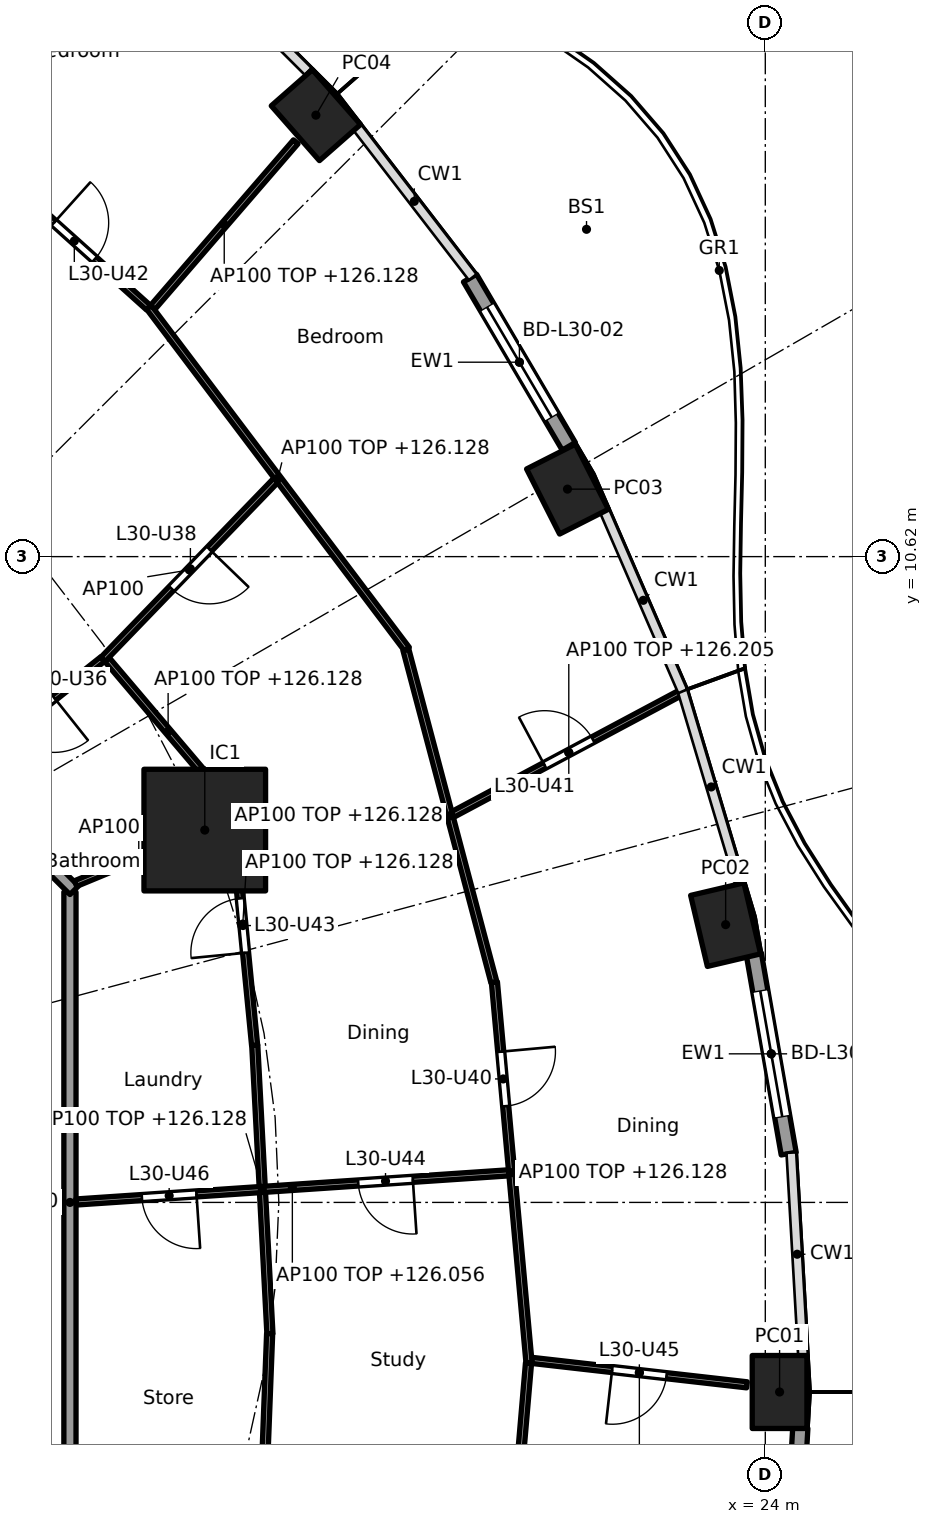
"""IFC4 building model, lengths in metres.
Left out: names, types, materials, properties, quantities, classifications, styles, units other than length and angle.
Written with IfcOpenShell. Run it as: python <this file> out.ifc"""

import sys

from ifc_helpers import new_model, si_unit, direction, frame, frame_2d, origin, origin_2d, place, context, subcontext, project, spatial, rectangle, hollow_rectangle, extrude, element, fill, save


model = new_model("IFC4")
c1 = context("Model", 3, precision=1e-05, world=origin(), true_north=direction((0.0, 1.0)))
c2 = subcontext(c1, "Body", "Model", "MODEL_VIEW")
j1 = project(units=[si_unit("LENGTHUNIT", "METRE"), si_unit("PLANEANGLEUNIT", "RADIAN")], contexts=[c1])
p1 = place(None, origin())
s1 = spatial("IfcSite", under=j1, at=p1, CompositionType="ELEMENT")
p2 = place(p1, origin())
s2 = spatial("IfcBuilding", under=s1, at=p2, CompositionType="ELEMENT")
p3 = place(p2, frame((0.0, 0.0, 123.3)))
s3 = spatial("IfcBuildingStorey", under=s2, at=p3, CompositionType="ELEMENT", Elevation=123.3)
for number, where, z_axis, x_axis in (
    (1, (24.235, -3.118, 0.0), (0.0, 0.0, 1.0), (0.0, 1.0, 0.0)),
    (2, (23.348, 4.568, 0.0), (0.0, 0.0, 1.0), (-0.229, 0.973, 0.0)),
    (3, (20.747, 11.73, 0.0), (0.0, 0.0, 1.0), (-0.452, 0.892, 0.0)),
    (4, (16.61, 17.88, 0.0), (0.0, 0.0, 1.0), (-0.66, 0.751, 0.0)),
):
    element("IfcColumn", number, at=place(p3, frame(where, z_axis=z_axis, x_axis=x_axis)), inside=s3, PredefinedType="COLUMN", context=c2, shape_type="SweptSolid", body=[
        extrude(hollow_rectangle(XDim=1.2, YDim=0.9, WallThickness=0.04, at=origin_2d()), origin(), (0.0, 0.0, 1.0), 3.7),
    ])
p4 = place(p3, frame((14.782, 6.123, 0.0), z_axis=(0.0, 0.0, 1.0), x_axis=(1.0, 0.0, 0.0)))
e5 = element("IfcColumn", 5, at=p4, inside=s3, PredefinedType="COLUMN", context=c2, shape_type="SweptSolid", body=[
    extrude(rectangle(XDim=2.0, YDim=2.0, at=origin_2d()), origin(), (0.0, 0.0, 1.0), 3.7),
])
p5 = place(p3, frame((23.811, 4.085, 0.0), z_axis=(0.0, 0.0, 1.0), x_axis=(0.172163521006, -0.985068384446, 0.0)))
e6 = element("IfcWall", 6, at=p5, inside=s3, PredefinedType="SOLIDWALL", context=c2, shape_type="SweptSolid", body=[
    extrude(rectangle(XDim=3.333, YDim=0.25, at=frame_2d((1.666, 0.0))), origin(), (0.0, 0.0, 1.0), 3.44),
])
p6 = place(p5, frame((0.616, 0.0, 0.0)))
e7 = element("IfcOpeningElement", 7, at=p6, cuts=e6, PredefinedType="OPENING", context=c2, shape_type="SweptSolid", body=[
    extrude(rectangle(XDim=2.1, YDim=2.4, at=frame_2d((1.05, 1.2))), frame((0.0, 0.135, 0.0), z_axis=(0.0, -1.0, 0.0), x_axis=(1.0, 0.0, 0.0)), (0.0, 0.0, 1.0), 0.27),
])
p7 = place(p3, frame((19.144, 15.201, 0.0), z_axis=(0.0, 0.0, 1.0), x_axis=(0.506314982873, -0.862348617508, 0.0)))
e8 = element("IfcWall", 8, at=p7, inside=s3, PredefinedType="SOLIDWALL", context=c2, shape_type="SweptSolid", body=[
    extrude(rectangle(XDim=3.208, YDim=0.25, at=frame_2d((1.604, 0.0))), origin(), (0.0, 0.0, 1.0), 3.44),
])
p8 = place(p7, frame((0.554, 0.0, 0.0)))
e9 = element("IfcOpeningElement", 9, at=p8, cuts=e8, PredefinedType="OPENING", context=c2, shape_type="SweptSolid", body=[
    extrude(rectangle(XDim=2.1, YDim=2.4, at=frame_2d((1.05, 1.2))), frame((0.0, 0.135, 0.0), z_axis=(0.0, -1.0, 0.0), x_axis=(1.0, 0.0, 0.0)), (0.0, 0.0, 1.0), 0.27),
])
p9 = place(p3, frame((24.576, -3.709, 0.0), z_axis=(0.0, 0.0, 1.0), x_axis=(-0.05746514539, -0.998347513176, 0.0)))
e10 = element("IfcWall", 10, at=p9, inside=s3, PredefinedType="SOLIDWALL", context=c2, shape_type="SweptSolid", body=[
    extrude(rectangle(XDim=3.348, YDim=0.25, at=frame_2d((1.674, 0.0))), origin(), (0.0, 0.0, 1.0), 3.44),
])
p10 = place(p9, frame((0.624, 0.0, 0.0)))
e11 = element("IfcOpeningElement", 11, at=p10, cuts=e10, PredefinedType="OPENING", context=c2, shape_type="SweptSolid", body=[
    extrude(rectangle(XDim=2.1, YDim=2.4, at=frame_2d((1.05, 1.2))), frame((0.0, 0.135, 0.0), z_axis=(0.0, -1.0, 0.0), x_axis=(1.0, 0.0, 0.0)), (0.0, 0.0, 1.0), 0.27),
])
p11 = place(p3, frame((12.565, -5.104, 0.0), z_axis=(0.0, 0.0, 1.0), x_axis=(0.0, 1.0, 0.0)))
e12 = element("IfcWall", 12, at=p11, inside=s3, PredefinedType="PARTITIONING", context=c2, shape_type="SweptSolid", body=[
    extrude(rectangle(XDim=10.209, YDim=0.2, at=frame_2d((5.104, 0.0))), origin(), (0.0, 0.0, 1.0), 3.44),
])
p12 = place(p3, frame((12.635, 5.134, 0.0), z_axis=(0.0, 0.0, 1.0), x_axis=(-0.707106781187, 0.707106781187, 0.0)))
e13 = element("IfcWall", 13, at=p12, inside=s3, PredefinedType="PARTITIONING", context=c2, shape_type="SweptSolid", body=[
    extrude(rectangle(XDim=10.609, YDim=0.2, at=frame_2d((5.305, 0.0))), origin(), (0.0, 0.0, 1.0), 3.44),
])
p13 = place(p12, frame((4.804, 0.0, 0.0)))
e14 = element("IfcOpeningElement", 14, at=p13, cuts=e13, PredefinedType="OPENING", context=c2, shape_type="SweptSolid", body=[
    extrude(rectangle(XDim=1.0, YDim=2.1, at=frame_2d((0.5, 1.05))), frame((0.0, 0.11, 0.0), z_axis=(0.0, -1.0, 0.0), x_axis=(1.0, 0.0, 0.0)), (0.0, 0.0, 1.0), 0.22),
])
p14 = place(p3, frame((15.853, -2.158, 0.0), z_axis=(0.0, 0.0, 1.0), x_axis=(-0.052483289253, 0.99862180246, 0.0)))
e15 = element("IfcWall", 15, at=p14, inside=s3, PredefinedType="PARTITIONING", context=c2, shape_type="SweptSolid", body=[
    extrude(rectangle(XDim=4.75, YDim=0.1, at=frame_2d((2.375, 0.0))), origin(), (0.0, 0.0, 1.0), 2.828),
])
p15 = place(p3, frame((15.849, -2.158, 0.0), z_axis=(0.0, 0.0, 1.0), x_axis=(-0.038390448414, -0.999262815014, 0.0)))
e16 = element("IfcWall", 16, at=p15, inside=s3, PredefinedType="PARTITIONING", context=c2, shape_type="SweptSolid", body=[
    extrude(rectangle(XDim=4.394, YDim=0.1, at=frame_2d((2.197, 0.0))), origin(), (0.0, 0.0, 1.0), 3.44),
])
p16 = place(p3, frame((20.16, -2.598, 0.0), z_axis=(0.0, 0.0, 1.0), x_axis=(0.993610673305, -0.112861994911, 0.0)))
e17 = element("IfcWall", 17, at=p16, inside=s3, PredefinedType="PARTITIONING", context=c2, shape_type="SweptSolid", body=[
    extrude(rectangle(XDim=3.561, YDim=0.1, at=frame_2d((1.78, 0.0))), origin(), (0.0, 0.0, 1.0), 2.828),
])
p17 = place(p16, frame((1.33, 0.0, 0.0)))
e18 = element("IfcOpeningElement", 18, at=p17, cuts=e17, PredefinedType="OPENING", context=c2, shape_type="SweptSolid", body=[
    extrude(rectangle(XDim=0.9, YDim=2.1, at=frame_2d((0.45, 1.05))), frame((0.0, 0.06, 0.0), z_axis=(0.0, -1.0, 0.0), x_axis=(1.0, 0.0, 0.0)), (0.0, 0.0, 1.0), 0.12),
])
p18 = place(p3, frame((20.115, -2.642, 0.0), z_axis=(0.0, 0.0, 1.0), x_axis=(-0.090563746294, 0.995890660593, 0.0)))
e19 = element("IfcWall", 19, at=p18, inside=s3, PredefinedType="PARTITIONING", context=c2, shape_type="SweptSolid", body=[
    extrude(rectangle(XDim=6.289, YDim=0.1, at=frame_2d((3.145, 0.0))), origin(), (0.0, 0.0, 1.0), 2.828),
])
p19 = place(p18, frame((4.242, 0.0, 0.0)))
e20 = element("IfcOpeningElement", 20, at=p19, cuts=e19, PredefinedType="OPENING", context=c2, shape_type="SweptSolid", body=[
    extrude(rectangle(XDim=0.9, YDim=2.1, at=frame_2d((0.45, 1.05))), frame((0.0, 0.06, 0.0), z_axis=(0.0, -1.0, 0.0), x_axis=(1.0, 0.0, 0.0)), (0.0, 0.0, 1.0), 0.12),
])
p20 = place(p3, frame((20.106, -2.642, 0.0), z_axis=(0.0, 0.0, 1.0), x_axis=(-0.085672025822, -0.996323393277, 0.0)))
e21 = element("IfcWall", 21, at=p20, inside=s3, PredefinedType="PARTITIONING", context=c2, shape_type="SweptSolid", body=[
    extrude(rectangle(XDim=6.007, YDim=0.1, at=frame_2d((3.003, 0.0))), origin(), (0.0, 0.0, 1.0), 2.828),
])
p21 = place(p3, frame((12.665, 0.007, 0.0), z_axis=(0.0, 0.0, 1.0), x_axis=(0.997737186236, 0.067234717233, 0.0)))
e22 = element("IfcWall", 22, at=p21, inside=s3, PredefinedType="PARTITIONING", context=c2, shape_type="SweptSolid", body=[
    extrude(rectangle(XDim=7.132, YDim=0.1, at=frame_2d((3.566, 0.0))), origin(), (0.0, 0.0, 1.0), 2.756),
])
p22 = place(p21, frame((4.651, 0.0, 0.0)))
e23 = element("IfcOpeningElement", 23, at=p22, cuts=e22, PredefinedType="OPENING", context=c2, shape_type="SweptSolid", body=[
    extrude(rectangle(XDim=0.9, YDim=2.1, at=frame_2d((0.45, 1.05))), frame((0.0, 0.06, 0.0), z_axis=(0.0, -1.0, 0.0), x_axis=(1.0, 0.0, 0.0)), (0.0, 0.0, 1.0), 0.12),
])
p23 = place(p21, frame((1.085, 0.0, 0.0)))
e24 = element("IfcOpeningElement", 24, at=p23, cuts=e22, PredefinedType="OPENING", context=c2, shape_type="SweptSolid", body=[
    extrude(rectangle(XDim=0.9, YDim=2.1, at=frame_2d((0.45, 1.05))), frame((0.0, 0.06, 0.0), z_axis=(0.0, -1.0, 0.0), x_axis=(1.0, 0.0, 0.0)), (0.0, 0.0, 1.0), 0.12),
])
p24 = place(p3, frame((15.602, 2.584, 0.0), z_axis=(0.0, 0.0, 1.0), x_axis=(-0.097216297846, 0.995263277446, 0.0)))
e25 = element("IfcWall", 25, at=p24, inside=s3, PredefinedType="PARTITIONING", context=c2, shape_type="SweptSolid", body=[
    extrude(rectangle(XDim=4.006, YDim=0.1, at=frame_2d((2.003, 0.0))), origin(), (0.0, 0.0, 1.0), 2.828),
])
p25 = place(p24, frame((1.528, 0.0, 0.0)))
e26 = element("IfcOpeningElement", 26, at=p25, cuts=e25, PredefinedType="OPENING", context=c2, shape_type="SweptSolid", body=[
    extrude(rectangle(XDim=0.9, YDim=2.1, at=frame_2d((0.45, 1.05))), frame((0.0, 0.06, 0.0), z_axis=(0.0, -1.0, 0.0), x_axis=(1.0, 0.0, 0.0)), (0.0, 0.0, 1.0), 0.12),
])
p26 = place(p3, frame((19.537, 3.62, 0.0), z_axis=(0.0, 0.0, 1.0), x_axis=(-0.255892560316, 0.966705227862, 0.0)))
e27 = element("IfcWall", 27, at=p26, inside=s3, PredefinedType="PARTITIONING", context=c2, shape_type="SweptSolid", body=[
    extrude(rectangle(XDim=5.659, YDim=0.1, at=frame_2d((2.829, 0.0))), origin(), (0.0, 0.0, 1.0), 2.828),
])
p27 = place(p3, frame((18.857, 6.378, 0.0), z_axis=(0.0, 0.0, 1.0), x_axis=(0.882223462934, 0.470830926607, 0.0)))
e28 = element("IfcWall", 28, at=p27, inside=s3, PredefinedType="PARTITIONING", context=c2, shape_type="SweptSolid", body=[
    extrude(rectangle(XDim=4.333, YDim=0.1, at=frame_2d((2.167, 0.0))), origin(), (0.0, 0.0, 1.0), 2.905),
])
p28 = place(p27, frame((1.717, 0.0, 0.0)))
e29 = element("IfcOpeningElement", 29, at=p28, cuts=e28, PredefinedType="OPENING", context=c2, shape_type="SweptSolid", body=[
    extrude(rectangle(XDim=0.9, YDim=2.1, at=frame_2d((0.45, 1.05))), frame((0.0, 0.06, 0.0), z_axis=(0.0, -1.0, 0.0), x_axis=(1.0, 0.0, 0.0)), (0.0, 0.0, 1.0), 0.12),
])
p29 = place(p3, frame((12.657, 5.243, 0.0), z_axis=(0.0, 0.0, 1.0), x_axis=(0.923864733477, 0.382719158442, 0.0)))
e30 = element("IfcWall", 30, at=p29, inside=s3, PredefinedType="PARTITIONING", context=c2, shape_type="SweptSolid", body=[
    extrude(rectangle(XDim=2.25, YDim=0.1, at=frame_2d((1.125, 0.0))), origin(), (0.0, 0.0, 1.0), 3.44),
])
p30 = place(p3, frame((15.185, 6.559, 0.0), z_axis=(0.0, 0.0, 1.0), x_axis=(-0.647360926376, 0.762183594026, 0.0)))
e31 = element("IfcWall", 31, at=p30, inside=s3, PredefinedType="PARTITIONING", context=c2, shape_type="SweptSolid", body=[
    extrude(rectangle(XDim=3.106, YDim=0.1, at=frame_2d((1.553, 0.0))), origin(), (0.0, 0.0, 1.0), 2.828),
])
p31 = place(p3, frame((18.106, 9.098, 0.0), z_axis=(0.0, 0.0, 1.0), x_axis=(-0.602398572907, 0.798195439325, 0.0)))
e32 = element("IfcWall", 32, at=p31, inside=s3, PredefinedType="PARTITIONING", context=c2, shape_type="SweptSolid", body=[
    extrude(rectangle(XDim=7.044, YDim=0.1, at=frame_2d((3.522, 0.0))), origin(), (0.0, 0.0, 1.0), 2.828),
])
p32 = place(p3, frame((10.803, 7.107, 0.0), z_axis=(0.0, 0.0, 1.0), x_axis=(0.782908385935, 0.622137010017, 0.0)))
e33 = element("IfcWall", 33, at=p32, inside=s3, PredefinedType="PARTITIONING", context=c2, shape_type="SweptSolid", body=[
    extrude(rectangle(XDim=2.937, YDim=0.1, at=frame_2d((1.469, 0.0))), origin(), (0.0, 0.0, 1.0), 2.756),
])
p33 = place(p32, frame((1.019, 0.0, 0.0)))
e34 = element("IfcOpeningElement", 34, at=p33, cuts=e33, PredefinedType="OPENING", context=c2, shape_type="SweptSolid", body=[
    extrude(rectangle(XDim=0.9, YDim=2.1, at=frame_2d((0.45, 1.05))), frame((0.0, 0.06, 0.0), z_axis=(0.0, -1.0, 0.0), x_axis=(1.0, 0.0, 0.0)), (0.0, 0.0, 1.0), 0.12),
])
p34 = place(p3, frame((13.107, 8.929, 0.0), z_axis=(0.0, 0.0, 1.0), x_axis=(0.694592384931, 0.719403515974, 0.0)))
e35 = element("IfcWall", 35, at=p34, inside=s3, PredefinedType="PARTITIONING", context=c2, shape_type="SweptSolid", body=[
    extrude(rectangle(XDim=4.094, YDim=0.1, at=frame_2d((2.047, 0.0))), origin(), (0.0, 0.0, 1.0), 3.44),
])
p35 = place(p34, frame((1.622, 0.0, 0.0)))
e36 = element("IfcOpeningElement", 36, at=p35, cuts=e35, PredefinedType="OPENING", context=c2, shape_type="SweptSolid", body=[
    extrude(rectangle(XDim=0.9, YDim=2.1, at=frame_2d((0.45, 1.05))), frame((0.0, 0.06, 0.0), z_axis=(0.0, -1.0, 0.0), x_axis=(1.0, 0.0, 0.0)), (0.0, 0.0, 1.0), 0.12),
])
p36 = place(p3, frame((13.926, 14.719, 0.0), z_axis=(0.0, 0.0, 1.0), x_axis=(0.653831857253, 0.756639876323, 0.0)))
e37 = element("IfcWall", 37, at=p36, inside=s3, PredefinedType="PARTITIONING", context=c2, shape_type="SweptSolid", body=[
    extrude(rectangle(XDim=3.598, YDim=0.1, at=frame_2d((1.799, 0.0))), origin(), (0.0, 0.0, 1.0), 2.828),
])
p37 = place(p3, frame((13.856, 14.714, 0.0), z_axis=(0.0, 0.0, 1.0), x_axis=(-0.743799395746, 0.668402916577, 0.0)))
e38 = element("IfcWall", 38, at=p37, inside=s3, PredefinedType="PARTITIONING", context=c2, shape_type="SweptSolid", body=[
    extrude(rectangle(XDim=6.509, YDim=0.1, at=frame_2d((3.254, 0.0))), origin(), (0.0, 0.0, 1.0), 2.828),
])
p38 = place(p37, frame((1.19, 0.0, 0.0)))
e39 = element("IfcOpeningElement", 39, at=p38, cuts=e38, PredefinedType="OPENING", context=c2, shape_type="SweptSolid", body=[
    extrude(rectangle(XDim=0.9, YDim=2.1, at=frame_2d((0.45, 1.05))), frame((0.0, 0.06, 0.0), z_axis=(0.0, -1.0, 0.0), x_axis=(1.0, 0.0, 0.0)), (0.0, 0.0, 1.0), 0.12),
])
p39 = place(p6, origin())
e40 = element("IfcDoor", 40, at=p39, inside=s3, OperationType="SLIDING_TO_LEFT", PredefinedType="DOOR", context=c2, shape_type="SweptSolid", body=[
    extrude(rectangle(XDim=2.1, YDim=2.4, at=frame_2d((1.05, 1.2))), frame((0.0, 0.025, 0.0), z_axis=(0.0, -1.0, 0.0), x_axis=(1.0, 0.0, 0.0)), (0.0, 0.0, 1.0), 0.05),
])
fill(e7, e40)
p40 = place(p8, origin())
e41 = element("IfcDoor", 41, at=p40, inside=s3, OperationType="SLIDING_TO_LEFT", PredefinedType="DOOR", context=c2, shape_type="SweptSolid", body=[
    extrude(rectangle(XDim=2.1, YDim=2.4, at=frame_2d((1.05, 1.2))), frame((0.0, 0.025, 0.0), z_axis=(0.0, -1.0, 0.0), x_axis=(1.0, 0.0, 0.0)), (0.0, 0.0, 1.0), 0.05),
])
fill(e9, e41)
p41 = place(p33, frame((0.9, 0.0, 0.0), x_axis=(-1.0, 0.0, 0.0)))
e42 = element("IfcDoor", 42, at=p41, inside=s3, OperationType="SINGLE_SWING_LEFT", PredefinedType="DOOR", context=c2, shape_type="SweptSolid", body=[
    extrude(rectangle(XDim=0.9, YDim=2.1, at=frame_2d((0.45, 1.05))), frame((0.0, 0.025, 0.0), z_axis=(0.0, -1.0, 0.0), x_axis=(1.0, 0.0, 0.0)), (0.0, 0.0, 1.0), 0.05),
])
fill(e34, e42)
p42 = place(p35, frame((0.9, 0.0, 0.0), x_axis=(-1.0, 0.0, 0.0)))
e43 = element("IfcDoor", 43, at=p42, inside=s3, OperationType="SINGLE_SWING_LEFT", PredefinedType="DOOR", context=c2, shape_type="SweptSolid", body=[
    extrude(rectangle(XDim=0.9, YDim=2.1, at=frame_2d((0.45, 1.05))), frame((0.0, 0.025, 0.0), z_axis=(0.0, -1.0, 0.0), x_axis=(1.0, 0.0, 0.0)), (0.0, 0.0, 1.0), 0.05),
])
fill(e36, e43)
p43 = place(p19, frame((0.9, 0.0, 0.0), x_axis=(-1.0, 0.0, 0.0)))
e44 = element("IfcDoor", 44, at=p43, inside=s3, OperationType="SINGLE_SWING_LEFT", PredefinedType="DOOR", context=c2, shape_type="SweptSolid", body=[
    extrude(rectangle(XDim=0.9, YDim=2.1, at=frame_2d((0.45, 1.05))), frame((0.0, 0.025, 0.0), z_axis=(0.0, -1.0, 0.0), x_axis=(1.0, 0.0, 0.0)), (0.0, 0.0, 1.0), 0.05),
])
fill(e20, e44)
p44 = place(p28, origin())
e45 = element("IfcDoor", 45, at=p44, inside=s3, OperationType="SINGLE_SWING_LEFT", PredefinedType="DOOR", context=c2, shape_type="SweptSolid", body=[
    extrude(rectangle(XDim=0.9, YDim=2.1, at=frame_2d((0.45, 1.05))), frame((0.0, 0.025, 0.0), z_axis=(0.0, -1.0, 0.0), x_axis=(1.0, 0.0, 0.0)), (0.0, 0.0, 1.0), 0.05),
])
fill(e29, e45)
p45 = place(p38, frame((0.9, 0.0, 0.0), x_axis=(-1.0, 0.0, 0.0)))
e46 = element("IfcDoor", 46, at=p45, inside=s3, OperationType="SINGLE_SWING_LEFT", PredefinedType="DOOR", context=c2, shape_type="SweptSolid", body=[
    extrude(rectangle(XDim=0.9, YDim=2.1, at=frame_2d((0.45, 1.05))), frame((0.0, 0.025, 0.0), z_axis=(0.0, -1.0, 0.0), x_axis=(1.0, 0.0, 0.0)), (0.0, 0.0, 1.0), 0.05),
])
fill(e39, e46)
p46 = place(p25, origin())
e47 = element("IfcDoor", 47, at=p46, inside=s3, OperationType="SINGLE_SWING_LEFT", PredefinedType="DOOR", context=c2, shape_type="SweptSolid", body=[
    extrude(rectangle(XDim=0.9, YDim=2.1, at=frame_2d((0.45, 1.05))), frame((0.0, 0.025, 0.0), z_axis=(0.0, -1.0, 0.0), x_axis=(1.0, 0.0, 0.0)), (0.0, 0.0, 1.0), 0.05),
])
fill(e26, e47)
p47 = place(p22, frame((0.9, 0.0, 0.0), x_axis=(-1.0, 0.0, 0.0)))
e48 = element("IfcDoor", 48, at=p47, inside=s3, OperationType="SINGLE_SWING_LEFT", PredefinedType="DOOR", context=c2, shape_type="SweptSolid", body=[
    extrude(rectangle(XDim=0.9, YDim=2.1, at=frame_2d((0.45, 1.05))), frame((0.0, 0.025, 0.0), z_axis=(0.0, -1.0, 0.0), x_axis=(1.0, 0.0, 0.0)), (0.0, 0.0, 1.0), 0.05),
])
fill(e23, e48)
p48 = place(p17, frame((0.9, 0.0, 0.0), x_axis=(-1.0, 0.0, 0.0)))
e49 = element("IfcDoor", 49, at=p48, inside=s3, OperationType="SINGLE_SWING_RIGHT", PredefinedType="DOOR", context=c2, shape_type="SweptSolid", body=[
    extrude(rectangle(XDim=0.9, YDim=2.1, at=frame_2d((0.45, 1.05))), frame((0.0, 0.025, 0.0), z_axis=(0.0, -1.0, 0.0), x_axis=(1.0, 0.0, 0.0)), (0.0, 0.0, 1.0), 0.05),
])
fill(e18, e49)
p49 = place(p23, frame((0.9, 0.0, 0.0), x_axis=(-1.0, 0.0, 0.0)))
e50 = element("IfcDoor", 50, at=p49, inside=s3, OperationType="SINGLE_SWING_LEFT", PredefinedType="DOOR", context=c2, shape_type="SweptSolid", body=[
    extrude(rectangle(XDim=0.9, YDim=2.1, at=frame_2d((0.45, 1.05))), frame((0.0, 0.025, 0.0), z_axis=(0.0, -1.0, 0.0), x_axis=(1.0, 0.0, 0.0)), (0.0, 0.0, 1.0), 0.05),
])
fill(e24, e50)
save(model, sys.argv[1])
